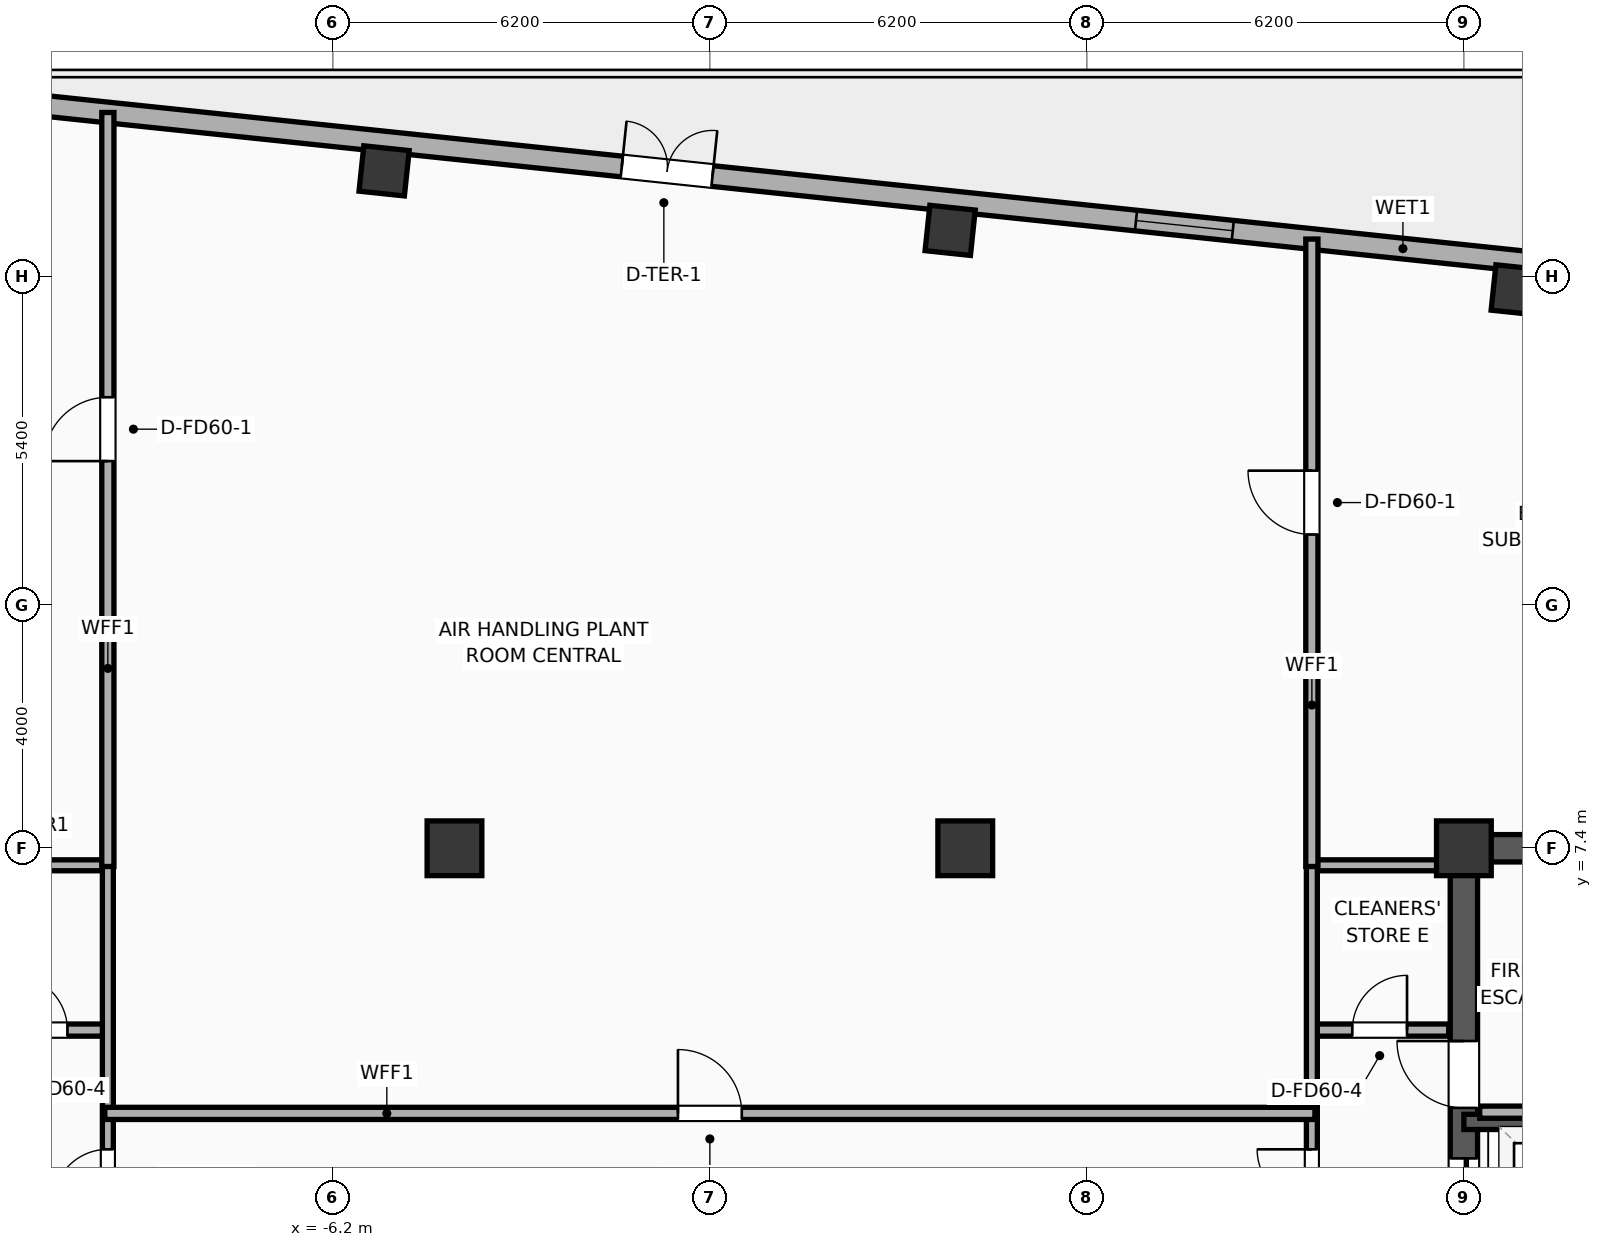
"""IFC4 building model, lengths in metres.
Left out: names, types, materials, properties, quantities, classifications, styles, units other than length and angle.
Written with IfcOpenShell. Run it as: python <this file> out.ifc"""

import sys

from ifc_helpers import new_model, si_unit, direction, frame, frame_2d, origin, origin_2d, place, context, subcontext, project, spatial, rectangle, hollow_rectangle, extrude, element, fill, save


model = new_model("IFC4")
c1 = context("Model", 3, precision=1e-05, world=origin(), true_north=direction((0.0, 1.0)))
c2 = subcontext(c1, "Body", "Model", "MODEL_VIEW")
j1 = project(units=[si_unit("LENGTHUNIT", "METRE"), si_unit("PLANEANGLEUNIT", "RADIAN")], contexts=[c1])
p1 = place(None, origin())
s1 = spatial("IfcSite", under=j1, at=p1, CompositionType="ELEMENT")
p2 = place(p1, origin())
s2 = spatial("IfcBuilding", under=s1, at=p2, CompositionType="ELEMENT")
p3 = place(p2, frame((0.0, 0.0, 254.8)))
s3 = spatial("IfcBuildingStorey", under=s2, at=p3, CompositionType="ELEMENT", Elevation=254.8)
p4 = place(p3, frame((12.4, 7.4, 0.0), z_axis=(0.0, 0.0, 1.0), x_axis=(1.0, 0.0, 0.0)))
e1 = element("IfcColumn", 1, at=p4, inside=s3, PredefinedType="COLUMN", context=c2, shape_type="SweptSolid", body=[
    extrude(rectangle(XDim=0.9, YDim=0.9, at=origin_2d()), origin(), (0.0, 0.0, 1.0), 5.2),
])
p5 = place(p3, frame((12.175, 7.4, 0.0), z_axis=(0.0, 0.0, 1.0), x_axis=(1.0, 0.0, 0.0)))
e2 = element("IfcWall", 2, at=p5, inside=s3, PredefinedType="SHEAR", context=c2, shape_type="SweptSolid", body=[
    extrude(rectangle(XDim=7.25, YDim=0.45, at=frame_2d((3.625, 0.0))), origin(), (0.0, 0.0, 1.0), 4.8),
])
p6 = place(p3, frame((12.4, -7.4, 0.0), z_axis=(0.0, 0.0, 1.0), x_axis=(0.0, 1.0, 0.0)))
e3 = element("IfcWall", 3, at=p6, inside=s3, PredefinedType="SHEAR", context=c2, shape_type="SweptSolid", body=[
    extrude(rectangle(XDim=14.8, YDim=0.45, at=frame_2d((7.4, 0.0))), origin(), (0.0, 0.0, 1.0), 4.8),
])
p7 = place(p6, frame((8.6, 0.0, 0.0)))
e4 = element("IfcOpeningElement", 4, at=p7, cuts=e3, PredefinedType="OPENING", context=c2, shape_type="SweptSolid", body=[
    extrude(rectangle(XDim=1.1, YDim=2.05, at=frame_2d((0.55, 1.025))), frame((0.0, 0.235, 0.0), z_axis=(0.0, -1.0, 0.0), x_axis=(1.0, 0.0, 0.0)), (0.0, 0.0, 1.0), 0.47),
])
p8 = place(p6, frame((10.53, 0.0, 0.0)))
e5 = element("IfcOpeningElement", 5, at=p8, cuts=e3, PredefinedType="OPENING", context=c2, shape_type="SweptSolid", body=[
    extrude(rectangle(XDim=1.1, YDim=2.05, at=frame_2d((0.55, 1.025))), frame((0.0, 0.235, 0.0), z_axis=(0.0, -1.0, 0.0), x_axis=(1.0, 0.0, 0.0)), (0.0, 0.0, 1.0), 0.47),
])
p9 = place(p6, frame((3.55, 0.0, 0.0)))
e6 = element("IfcOpeningElement", 6, at=p9, cuts=e3, PredefinedType="OPENING", context=c2, shape_type="SweptSolid", body=[
    extrude(rectangle(XDim=0.9, YDim=2.05, at=frame_2d((0.45, 1.025))), frame((0.0, 0.235, 0.0), z_axis=(0.0, -1.0, 0.0), x_axis=(1.0, 0.0, 0.0)), (0.0, 0.0, 1.0), 0.47),
])
for number, where, z_axis, x_axis in (
    (7, (-4.2, 7.4, 0.0), (0.0, 0.0, 1.0), (1.0, 0.0, 0.0)),
    (8, (4.2, 7.4, 0.0), (0.0, 0.0, 1.0), (1.0, 0.0, 0.0)),
):
    element("IfcColumn", number, at=place(p3, frame(where, z_axis=z_axis, x_axis=x_axis)), inside=s3, PredefinedType="COLUMN", context=c2, shape_type="SweptSolid", body=[
        extrude(rectangle(XDim=0.9, YDim=0.9, at=origin_2d()), origin(), (0.0, 0.0, 1.0), 5.2),
    ])
for number, where, z_axis, x_axis in (
    (9, (13.26, 16.583, -0.4), (0.0, 0.0, 1.0), (0.995, -0.105, 0.0)),
    (10, (3.952, 17.561, -0.4), (0.0, 0.0, 1.0), (0.995, -0.105, 0.0)),
    (11, (-5.357, 18.54, -0.4), (0.0, 0.0, 1.0), (0.995, -0.105, 0.0)),
):
    element("IfcColumn", number, at=place(p3, frame(where, z_axis=z_axis, x_axis=x_axis)), inside=s3, PredefinedType="COLUMN", context=c2, shape_type="SweptSolid", body=[
        extrude(hollow_rectangle(XDim=0.75, YDim=0.75, WallThickness=0.025, at=origin_2d()), origin(), (0.0, 0.0, 1.0), 5.6),
    ])
p10 = place(p3, frame((-23.908, 20.972, 0.0), z_axis=(0.0, 0.0, 1.0), x_axis=(0.994521888554, -0.104528528102, 0.0)))
e12 = element("IfcWall", 12, at=p10, inside=s3, PredefinedType="ELEMENTEDWALL", context=c2, shape_type="SweptSolid", body=[
    extrude(rectangle(XDim=46.766, YDim=0.34, at=frame_2d((23.383, 0.0))), origin(), (0.0, 0.0, 1.0), 3.69),
])
p11 = place(p10, frame((1.326, 0.0, 0.75)))
e13 = element("IfcOpeningElement", 13, at=p11, cuts=e12, PredefinedType="OPENING", context=c2, shape_type="SweptSolid", body=[
    extrude(rectangle(XDim=1.6, YDim=1.4, at=frame_2d((0.8, 0.7))), frame((0.0, 0.18, 0.0), z_axis=(0.0, -1.0, 0.0), x_axis=(1.0, 0.0, 0.0)), (0.0, 0.0, 1.0), 0.36),
])
p12 = place(p10, frame((5.577, 0.0, 0.75)))
e14 = element("IfcOpeningElement", 14, at=p12, cuts=e12, PredefinedType="OPENING", context=c2, shape_type="SweptSolid", body=[
    extrude(rectangle(XDim=1.6, YDim=1.4, at=frame_2d((0.8, 0.7))), frame((0.0, 0.18, 0.0), z_axis=(0.0, -1.0, 0.0), x_axis=(1.0, 0.0, 0.0)), (0.0, 0.0, 1.0), 0.36),
])
p13 = place(p10, frame((22.583, 0.0, 0.0)))
e15 = element("IfcOpeningElement", 15, at=p13, cuts=e12, PredefinedType="OPENING", context=c2, shape_type="SweptSolid", body=[
    extrude(rectangle(XDim=1.5, YDim=2.05, at=frame_2d((0.75, 1.025))), frame((0.0, 0.18, 0.0), z_axis=(0.0, -1.0, 0.0), x_axis=(1.0, 0.0, 0.0)), (0.0, 0.0, 1.0), 0.36),
])
p14 = place(p10, frame((31.086, 0.0, 0.75)))
e16 = element("IfcOpeningElement", 16, at=p14, cuts=e12, PredefinedType="OPENING", context=c2, shape_type="SweptSolid", body=[
    extrude(rectangle(XDim=1.6, YDim=1.4, at=frame_2d((0.8, 0.7))), frame((0.0, 0.18, 0.0), z_axis=(0.0, -1.0, 0.0), x_axis=(1.0, 0.0, 0.0)), (0.0, 0.0, 1.0), 0.36),
])
p15 = place(p10, frame((39.589, 0.0, 0.75)))
e17 = element("IfcOpeningElement", 17, at=p15, cuts=e12, PredefinedType="OPENING", context=c2, shape_type="SweptSolid", body=[
    extrude(rectangle(XDim=1.6, YDim=1.4, at=frame_2d((0.8, 0.7))), frame((0.0, 0.18, 0.0), z_axis=(0.0, -1.0, 0.0), x_axis=(1.0, 0.0, 0.0)), (0.0, 0.0, 1.0), 0.36),
])
p16 = place(p10, frame((43.841, 0.0, 0.75)))
e18 = element("IfcOpeningElement", 18, at=p16, cuts=e12, PredefinedType="OPENING", context=c2, shape_type="SweptSolid", body=[
    extrude(rectangle(XDim=1.6, YDim=1.4, at=frame_2d((0.8, 0.7))), frame((0.0, 0.18, 0.0), z_axis=(0.0, -1.0, 0.0), x_axis=(1.0, 0.0, 0.0)), (0.0, 0.0, 1.0), 0.36),
])
p17 = place(p3, frame((15.4, 2.9, 0.0), z_axis=(0.0, 0.0, 1.0), x_axis=(-1.0, 0.0, 0.0)))
e19 = element("IfcWall", 19, at=p17, inside=s3, PredefinedType="SOLIDWALL", context=c2, shape_type="SweptSolid", body=[
    extrude(rectangle(XDim=3.0, YDim=0.25, at=frame_2d((1.5, 0.0))), origin(), (0.0, 0.0, 1.0), 4.8),
])
p18 = place(p3, frame((-12.15, 4.41, 0.0), z_axis=(0.0, 0.0, 1.0), x_axis=(1.0, 0.0, 0.0)))
e20 = element("IfcWall", 20, at=p18, inside=s3, PredefinedType="PARTITIONING", context=c2, shape_type="SweptSolid", body=[
    extrude(rectangle(XDim=2.27, YDim=0.2, at=frame_2d((1.135, 0.0))), origin(), (0.0, 0.0, 1.0), 4.8),
])
p19 = place(p18, frame((0.685, 0.0, 0.0)))
e21 = element("IfcOpeningElement", 21, at=p19, cuts=e20, PredefinedType="OPENING", context=c2, shape_type="SweptSolid", body=[
    extrude(rectangle(XDim=0.9, YDim=2.05, at=frame_2d((0.45, 1.025))), frame((0.0, 0.11, 0.0), z_axis=(0.0, -1.0, 0.0), x_axis=(1.0, 0.0, 0.0)), (0.0, 0.0, 1.0), 0.22),
])
p20 = place(p3, frame((-12.15, 7.12, 0.0), z_axis=(0.0, 0.0, 1.0), x_axis=(1.0, 0.0, 0.0)))
e22 = element("IfcWall", 22, at=p20, inside=s3, PredefinedType="PARTITIONING", context=c2, shape_type="SweptSolid", body=[
    extrude(rectangle(XDim=2.27, YDim=0.18, at=frame_2d((1.135, 0.0))), origin(), (0.0, 0.0, 1.0), 3.84),
])
p21 = place(p3, frame((12.66, 3.06, 0.0), z_axis=(0.0, 0.0, 1.0), x_axis=(1.0, 0.0, 0.0)))
e23 = element("IfcWall", 23, at=p21, inside=s3, PredefinedType="PARTITIONING", context=c2, shape_type="SweptSolid", body=[
    extrude(rectangle(XDim=3.16, YDim=0.2, at=frame_2d((1.58, 0.0))), origin(), (0.0, 0.0, 1.0), 4.8),
])
p22 = place(p3, frame((9.88, 4.41, 0.0), z_axis=(0.0, 0.0, 1.0), x_axis=(1.0, 0.0, 0.0)))
e24 = element("IfcWall", 24, at=p22, inside=s3, PredefinedType="PARTITIONING", context=c2, shape_type="SweptSolid", body=[
    extrude(rectangle(XDim=2.27, YDim=0.2, at=frame_2d((1.135, 0.0))), origin(), (0.0, 0.0, 1.0), 4.8),
])
p23 = place(p22, frame((0.685, 0.0, 0.0)))
e25 = element("IfcOpeningElement", 25, at=p23, cuts=e24, PredefinedType="OPENING", context=c2, shape_type="SweptSolid", body=[
    extrude(rectangle(XDim=0.9, YDim=2.05, at=frame_2d((0.45, 1.025))), frame((0.0, 0.11, 0.0), z_axis=(0.0, -1.0, 0.0), x_axis=(1.0, 0.0, 0.0)), (0.0, 0.0, 1.0), 0.22),
])
p24 = place(p3, frame((9.88, 7.12, 0.0), z_axis=(0.0, 0.0, 1.0), x_axis=(1.0, 0.0, 0.0)))
e26 = element("IfcWall", 26, at=p24, inside=s3, PredefinedType="PARTITIONING", context=c2, shape_type="SweptSolid", body=[
    extrude(rectangle(XDim=2.27, YDim=0.18, at=frame_2d((1.135, 0.0))), origin(), (0.0, 0.0, 1.0), 3.84),
])
p25 = place(p3, frame((-9.9, -7.14, 0.0), z_axis=(0.0, 0.0, 1.0), x_axis=(0.0, 1.0, 0.0)))
e27 = element("IfcWall", 27, at=p25, inside=s3, PredefinedType="PARTITIONING", context=c2, shape_type="SweptSolid", body=[
    extrude(rectangle(XDim=14.28, YDim=0.18, at=frame_2d((7.14, 0.0))), origin(), (0.0, 0.0, 1.0), 4.8),
])
p26 = place(p25, frame((8.689, 0.0, 0.0)))
e28 = element("IfcOpeningElement", 28, at=p26, cuts=e27, PredefinedType="OPENING", context=c2, shape_type="SweptSolid", body=[
    extrude(rectangle(XDim=0.9, YDim=2.05, at=frame_2d((0.45, 1.025))), frame((0.0, 0.1, 0.0), z_axis=(0.0, -1.0, 0.0), x_axis=(1.0, 0.0, 0.0)), (0.0, 0.0, 1.0), 0.2),
])
p27 = place(p3, frame((9.9, -7.14, 0.0), z_axis=(0.0, 0.0, 1.0), x_axis=(0.0, 1.0, 0.0)))
e29 = element("IfcWall", 29, at=p27, inside=s3, PredefinedType="PARTITIONING", context=c2, shape_type="SweptSolid", body=[
    extrude(rectangle(XDim=14.28, YDim=0.18, at=frame_2d((7.14, 0.0))), origin(), (0.0, 0.0, 1.0), 4.8),
])
p28 = place(p27, frame((8.689, 0.0, 0.0)))
e30 = element("IfcOpeningElement", 30, at=p28, cuts=e29, PredefinedType="OPENING", context=c2, shape_type="SweptSolid", body=[
    extrude(rectangle(XDim=0.9, YDim=2.05, at=frame_2d((0.45, 1.025))), frame((0.0, 0.1, 0.0), z_axis=(0.0, -1.0, 0.0), x_axis=(1.0, 0.0, 0.0)), (0.0, 0.0, 1.0), 0.2),
])
p29 = place(p3, frame((-9.95, 3.04, 0.0), z_axis=(0.0, 0.0, 1.0), x_axis=(1.0, 0.0, 0.0)))
e31 = element("IfcWall", 31, at=p29, inside=s3, PredefinedType="PARTITIONING", context=c2, shape_type="SweptSolid", body=[
    extrude(rectangle(XDim=19.9, YDim=0.2, at=frame_2d((9.95, 0.0))), origin(), (0.0, 0.0, 1.0), 4.8),
])
p30 = place(p29, frame((9.425, 0.0, 0.0)))
e32 = element("IfcOpeningElement", 32, at=p30, cuts=e31, PredefinedType="OPENING", context=c2, shape_type="SweptSolid", body=[
    extrude(rectangle(XDim=1.05, YDim=2.05, at=frame_2d((0.525, 1.025))), frame((0.0, 0.11, 0.0), z_axis=(0.0, -1.0, 0.0), x_axis=(1.0, 0.0, 0.0)), (0.0, 0.0, 1.0), 0.22),
])
p31 = place(p3, frame((-9.9, 7.1, 0.0), z_axis=(0.0, 0.0, 1.0), x_axis=(0.0, 1.0, 0.0)))
e33 = element("IfcWall", 33, at=p31, inside=s3, PredefinedType="PARTITIONING", context=c2, shape_type="SweptSolid", body=[
    extrude(rectangle(XDim=12.4, YDim=0.2, at=frame_2d((6.2, 0.0))), origin(), (0.0, 0.0, 1.0), 4.8),
])
p32 = place(p31, frame((6.667, 0.0, 0.0)))
e34 = element("IfcOpeningElement", 34, at=p32, cuts=e33, PredefinedType="OPENING", context=c2, shape_type="SweptSolid", body=[
    extrude(rectangle(XDim=1.05, YDim=2.05, at=frame_2d((0.525, 1.025))), frame((0.0, 0.11, 0.0), z_axis=(0.0, -1.0, 0.0), x_axis=(1.0, 0.0, 0.0)), (0.0, 0.0, 1.0), 0.22),
])
p33 = place(p3, frame((9.9, 7.1, 0.0), z_axis=(0.0, 0.0, 1.0), x_axis=(0.0, 1.0, 0.0)))
e35 = element("IfcWall", 35, at=p33, inside=s3, PredefinedType="PARTITIONING", context=c2, shape_type="SweptSolid", body=[
    extrude(rectangle(XDim=10.319, YDim=0.2, at=frame_2d((5.159, 0.0))), origin(), (0.0, 0.0, 1.0), 4.8),
])
p34 = place(p33, frame((5.46, 0.0, 0.0)))
e36 = element("IfcOpeningElement", 36, at=p34, cuts=e35, PredefinedType="OPENING", context=c2, shape_type="SweptSolid", body=[
    extrude(rectangle(XDim=1.05, YDim=2.05, at=frame_2d((0.525, 1.025))), frame((0.0, 0.11, 0.0), z_axis=(0.0, -1.0, 0.0), x_axis=(1.0, 0.0, 0.0)), (0.0, 0.0, 1.0), 0.22),
])
p35 = place(p13, origin())
e37 = element("IfcDoor", 37, at=p35, inside=s3, OperationType="DOUBLE_DOOR_SINGLE_SWING", PredefinedType="DOOR", context=c2, shape_type="SweptSolid", body=[
    extrude(rectangle(XDim=1.5, YDim=2.05, at=frame_2d((0.75, 1.025))), frame((0.0, 0.025, 0.0), z_axis=(0.0, -1.0, 0.0), x_axis=(1.0, 0.0, 0.0)), (0.0, 0.0, 1.0), 0.05),
])
fill(e15, e37)
p36 = place(p14, origin())
e38 = element("IfcWindow", 38, at=p36, inside=s3, PartitioningType="SINGLE_PANEL", PredefinedType="WINDOW", context=c2, shape_type="SweptSolid", body=[
    extrude(rectangle(XDim=1.6, YDim=1.4, at=frame_2d((0.8, 0.7))), frame((0.0, 0.03, 0.0), z_axis=(0.0, -1.0, 0.0), x_axis=(1.0, 0.0, 0.0)), (0.0, 0.0, 1.0), 0.06),
])
fill(e16, e38)
p37 = place(p7, origin())
e39 = element("IfcDoor", 39, at=p37, inside=s3, OperationType="SLIDING_TO_LEFT", PredefinedType="DOOR", context=c2, shape_type="SweptSolid", body=[
    extrude(rectangle(XDim=1.1, YDim=2.05, at=frame_2d((0.55, 1.025))), frame((0.0, 0.025, 0.0), z_axis=(0.0, -1.0, 0.0), x_axis=(1.0, 0.0, 0.0)), (0.0, 0.0, 1.0), 0.05),
])
fill(e4, e39)
p38 = place(p19, origin())
e40 = element("IfcDoor", 40, at=p38, inside=s3, OperationType="SINGLE_SWING_LEFT", PredefinedType="DOOR", context=c2, shape_type="SweptSolid", body=[
    extrude(rectangle(XDim=0.9, YDim=2.05, at=frame_2d((0.45, 1.025))), frame((0.0, 0.025, 0.0), z_axis=(0.0, -1.0, 0.0), x_axis=(1.0, 0.0, 0.0)), (0.0, 0.0, 1.0), 0.05),
])
fill(e21, e40)
p39 = place(p23, origin())
e41 = element("IfcDoor", 41, at=p39, inside=s3, OperationType="SINGLE_SWING_RIGHT", PredefinedType="DOOR", context=c2, shape_type="SweptSolid", body=[
    extrude(rectangle(XDim=0.9, YDim=2.05, at=frame_2d((0.45, 1.025))), frame((0.0, 0.025, 0.0), z_axis=(0.0, -1.0, 0.0), x_axis=(1.0, 0.0, 0.0)), (0.0, 0.0, 1.0), 0.05),
])
fill(e25, e41)
p40 = place(p26, origin())
e42 = element("IfcDoor", 42, at=p40, inside=s3, OperationType="SINGLE_SWING_LEFT", PredefinedType="DOOR", context=c2, shape_type="SweptSolid", body=[
    extrude(rectangle(XDim=0.9, YDim=2.05, at=frame_2d((0.45, 1.025))), frame((0.0, 0.025, 0.0), z_axis=(0.0, -1.0, 0.0), x_axis=(1.0, 0.0, 0.0)), (0.0, 0.0, 1.0), 0.05),
])
fill(e28, e42)
p41 = place(p28, origin())
e43 = element("IfcDoor", 43, at=p41, inside=s3, OperationType="SINGLE_SWING_RIGHT", PredefinedType="DOOR", context=c2, shape_type="SweptSolid", body=[
    extrude(rectangle(XDim=0.9, YDim=2.05, at=frame_2d((0.45, 1.025))), frame((0.0, 0.025, 0.0), z_axis=(0.0, -1.0, 0.0), x_axis=(1.0, 0.0, 0.0)), (0.0, 0.0, 1.0), 0.05),
])
fill(e30, e43)
p42 = place(p30, origin())
e44 = element("IfcDoor", 44, at=p42, inside=s3, OperationType="SINGLE_SWING_LEFT", PredefinedType="DOOR", context=c2, shape_type="SweptSolid", body=[
    extrude(rectangle(XDim=1.05, YDim=2.05, at=frame_2d((0.525, 1.025))), frame((0.0, 0.025, 0.0), z_axis=(0.0, -1.0, 0.0), x_axis=(1.0, 0.0, 0.0)), (0.0, 0.0, 1.0), 0.05),
])
fill(e32, e44)
p43 = place(p32, origin())
e45 = element("IfcDoor", 45, at=p43, inside=s3, OperationType="SINGLE_SWING_LEFT", PredefinedType="DOOR", context=c2, shape_type="SweptSolid", body=[
    extrude(rectangle(XDim=1.05, YDim=2.05, at=frame_2d((0.525, 1.025))), frame((0.0, 0.025, 0.0), z_axis=(0.0, -1.0, 0.0), x_axis=(1.0, 0.0, 0.0)), (0.0, 0.0, 1.0), 0.05),
])
fill(e34, e45)
p44 = place(p34, origin())
e46 = element("IfcDoor", 46, at=p44, inside=s3, OperationType="SINGLE_SWING_RIGHT", PredefinedType="DOOR", context=c2, shape_type="SweptSolid", body=[
    extrude(rectangle(XDim=1.05, YDim=2.05, at=frame_2d((0.525, 1.025))), frame((0.0, 0.025, 0.0), z_axis=(0.0, -1.0, 0.0), x_axis=(1.0, 0.0, 0.0)), (0.0, 0.0, 1.0), 0.05),
])
fill(e36, e46)
p45 = place(p8, origin())
e47 = element("IfcDoor", 47, at=p45, inside=s3, OperationType="SINGLE_SWING_RIGHT", PredefinedType="DOOR", context=c2, shape_type="SweptSolid", body=[
    extrude(rectangle(XDim=1.1, YDim=2.05, at=frame_2d((0.55, 1.025))), frame((0.0, 0.025, 0.0), z_axis=(0.0, -1.0, 0.0), x_axis=(1.0, 0.0, 0.0)), (0.0, 0.0, 1.0), 0.05),
])
fill(e5, e47)
save(model, sys.argv[1])
